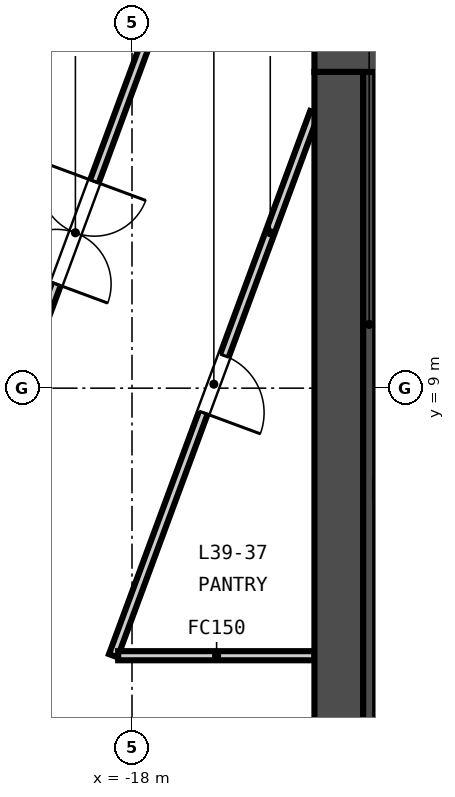
"""IFC4 building model, lengths in metres.
Left out: names, types, materials, properties, quantities, classifications, styles, units other than length and angle.
Written with IfcOpenShell. Run it as: python <this file> out.ifc"""

import sys

from ifc_helpers import new_model, si_unit, direction, frame, frame_2d, origin, place, context, subcontext, project, spatial, rectangle, extrude, element, fill, save


model = new_model("IFC4")
c1 = context("Model", 3, precision=1e-05, world=origin(), true_north=direction((0.0, 1.0)))
c2 = subcontext(c1, "Body", "Model", "MODEL_VIEW")
j1 = project(units=[si_unit("LENGTHUNIT", "METRE"), si_unit("PLANEANGLEUNIT", "RADIAN")], contexts=[c1])
p1 = place(None, origin())
s1 = spatial("IfcSite", under=j1, at=p1, CompositionType="ELEMENT")
p2 = place(p1, origin())
s2 = spatial("IfcBuilding", under=s1, at=p2, CompositionType="ELEMENT")
p3 = place(p2, frame((0.0, 0.0, 159.0)))
s3 = spatial("IfcBuildingStorey", under=s2, at=p3, CompositionType="ELEMENT", Elevation=159.0)
p4 = place(p3, frame((-15.0, 14.6, -0.15), z_axis=(0.0, 0.0, 1.0), x_axis=(1.0, 0.0, 0.0)))
e1 = element("IfcWall", 1, at=p4, inside=s3, PredefinedType="SOLIDWALL", context=c2, shape_type="SweptSolid", body=[
    extrude(rectangle(XDim=30.0, YDim=0.8, at=frame_2d((15.0, 0.0))), origin(), (0.0, 0.0, 1.0), 3.65),
])
p5 = place(p4, frame((9.25, 0.0, 0.15)))
e2 = element("IfcOpeningElement", 2, at=p5, cuts=e1, PredefinedType="OPENING", context=c2, shape_type="SweptSolid", body=[
    extrude(rectangle(XDim=1.5, YDim=2.1, at=frame_2d((0.75, 1.05))), frame((0.0, 0.41, 0.0), z_axis=(0.0, -1.0, 0.0), x_axis=(1.0, 0.0, 0.0)), (0.0, 0.0, 1.0), 0.82),
])
p6 = place(p4, frame((19.4, 0.0, 0.15)))
e3 = element("IfcOpeningElement", 3, at=p6, cuts=e1, PredefinedType="OPENING", context=c2, shape_type="SweptSolid", body=[
    extrude(rectangle(XDim=1.5, YDim=2.1, at=frame_2d((0.75, 1.05))), frame((0.0, 0.41, 0.0), z_axis=(0.0, -1.0, 0.0), x_axis=(1.0, 0.0, 0.0)), (0.0, 0.0, 1.0), 0.82),
])
p7 = place(p4, frame((1.5, 0.0, 0.15)))
e4 = element("IfcOpeningElement", 4, at=p7, cuts=e1, PredefinedType="OPENING", context=c2, shape_type="SweptSolid", body=[
    extrude(rectangle(XDim=1.2, YDim=2.1, at=frame_2d((0.6, 1.05))), frame((0.0, 0.41, 0.0), z_axis=(0.0, -1.0, 0.0), x_axis=(1.0, 0.0, 0.0)), (0.0, 0.0, 1.0), 0.82),
])
p8 = place(p4, frame((27.3, 0.0, 0.15)))
e5 = element("IfcOpeningElement", 5, at=p8, cuts=e1, PredefinedType="OPENING", context=c2, shape_type="SweptSolid", body=[
    extrude(rectangle(XDim=1.2, YDim=2.1, at=frame_2d((0.6, 1.05))), frame((0.0, 0.41, 0.0), z_axis=(0.0, -1.0, 0.0), x_axis=(1.0, 0.0, 0.0)), (0.0, 0.0, 1.0), 0.82),
])
p9 = place(p3, frame((-14.6, 0.8, -0.15), z_axis=(0.0, 0.0, 1.0), x_axis=(0.0, 1.0, 0.0)))
e6 = element("IfcWall", 6, at=p9, inside=s3, PredefinedType="SOLIDWALL", context=c2, shape_type="SweptSolid", body=[
    extrude(rectangle(XDim=13.4, YDim=0.8, at=frame_2d((6.7, 0.0))), origin(), (0.0, 0.0, 1.0), 3.65),
])
p10 = place(p3, frame((-14.1, 0.8, 0.0), z_axis=(0.0, 0.0, 1.0), x_axis=(0.0, 1.0, 0.0)))
e7 = element("IfcWall", 7, at=p10, inside=s3, PredefinedType="SOLIDWALL", context=c2, shape_type="SweptSolid", body=[
    extrude(rectangle(XDim=13.4, YDim=0.2, at=frame_2d((6.7, 0.0))), origin(), (0.0, 0.0, 1.0), 3.5),
])
p11 = place(p3, frame((-15.0, 13.531, 0.0), z_axis=(0.0, 0.0, 1.0), x_axis=(-0.347347751601, -0.937736391241, 0.0)))
e8 = element("IfcWall", 8, at=p11, inside=s3, PredefinedType="PARTITIONING", context=c2, shape_type="SweptSolid", body=[
    extrude(rectangle(XDim=9.524, YDim=0.15, at=frame_2d((4.762, 0.0))), origin(), (0.0, 0.0, 1.0), 2.741),
])
p12 = place(p11, frame((4.262, 0.0, 0.0)))
e9 = element("IfcOpeningElement", 9, at=p12, cuts=e8, PredefinedType="OPENING", context=c2, shape_type="SweptSolid", body=[
    extrude(rectangle(XDim=1.0, YDim=2.1, at=frame_2d((0.5, 1.05))), frame((0.0, 0.085, 0.0), z_axis=(0.0, -1.0, 0.0), x_axis=(1.0, 0.0, 0.0)), (0.0, 0.0, 1.0), 0.17),
])
p13 = place(p3, frame((-21.318, 5.111, 0.0), z_axis=(0.0, 0.0, 1.0), x_axis=(0.347346173898, 0.937736975638, 0.0)))
e10 = element("IfcWall", 10, at=p13, inside=s3, PredefinedType="PARTITIONING", context=c2, shape_type="SweptSolid", body=[
    extrude(rectangle(XDim=13.745, YDim=0.15, at=frame_2d((6.872, 0.0))), origin(), (0.0, 0.0, 1.0), 2.741),
])
p14 = place(p13, frame((5.972, 0.0, 0.0)))
e11 = element("IfcOpeningElement", 11, at=p14, cuts=e10, PredefinedType="OPENING", context=c2, shape_type="SweptSolid", body=[
    extrude(rectangle(XDim=1.8, YDim=2.1, at=frame_2d((0.9, 1.05))), frame((0.0, 0.085, 0.0), z_axis=(0.0, -1.0, 0.0), x_axis=(1.0, 0.0, 0.0)), (0.0, 0.0, 1.0), 0.17),
])
p15 = place(p3, frame((-18.228, 4.6, 0.0), z_axis=(0.0, 0.0, 1.0), x_axis=(1.0, 0.0, 0.0)))
e12 = element("IfcWall", 12, at=p15, inside=s3, PredefinedType="PARTITIONING", context=c2, shape_type="SweptSolid", body=[
    extrude(rectangle(XDim=3.228, YDim=0.15, at=frame_2d((1.614, 0.0))), origin(), (0.0, 0.0, 1.0), 2.741),
])
p16 = place(p14, origin())
e13 = element("IfcDoor", 13, at=p16, inside=s3, OperationType="DOUBLE_DOOR_DOUBLE_SWING", PredefinedType="DOOR", context=c2, shape_type="SweptSolid", body=[
    extrude(rectangle(XDim=1.8, YDim=2.1, at=frame_2d((0.9, 1.05))), frame((0.0, 0.025, 0.0), z_axis=(0.0, -1.0, 0.0), x_axis=(1.0, 0.0, 0.0)), (0.0, 0.0, 1.0), 0.05),
])
fill(e11, e13)
p17 = place(p12, origin())
e14 = element("IfcDoor", 14, at=p17, inside=s3, OperationType="SINGLE_SWING_RIGHT", PredefinedType="DOOR", context=c2, shape_type="SweptSolid", body=[
    extrude(rectangle(XDim=1.0, YDim=2.1, at=frame_2d((0.5, 1.05))), frame((0.0, 0.025, 0.0), z_axis=(0.0, -1.0, 0.0), x_axis=(1.0, 0.0, 0.0)), (0.0, 0.0, 1.0), 0.05),
])
fill(e9, e14)
save(model, sys.argv[1])
